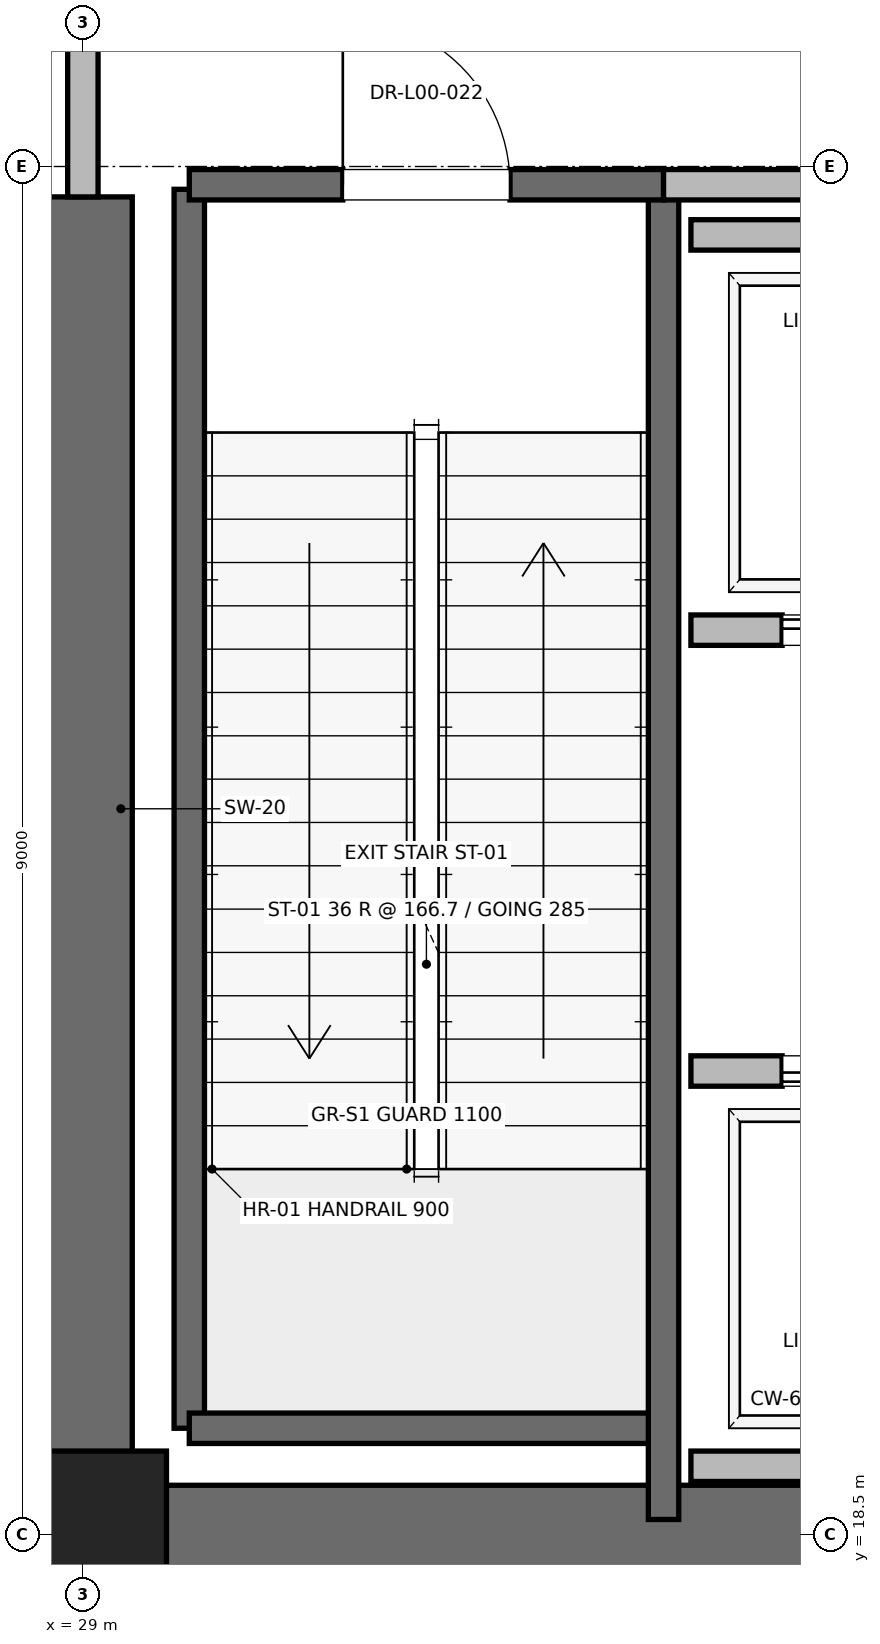
"""IFC4 building model, lengths in metres.
Left out: names, types, materials, properties, quantities, classifications, styles, units other than length and angle.
Written with IfcOpenShell. Run it as: python <this file> out.ifc"""

import sys

from ifc_helpers import new_model, si_unit, direction, frame, frame_2d, origin, origin_2d, place, context, subcontext, project, spatial, rectangle, extrude, element, fill, save


model = new_model("IFC4")
c1 = context("Model", 3, precision=1e-05, world=origin(), true_north=direction((0.0, 1.0)))
c2 = subcontext(c1, "Body", "Model", "MODEL_VIEW")
j1 = project(units=[si_unit("LENGTHUNIT", "METRE"), si_unit("PLANEANGLEUNIT", "RADIAN")], contexts=[c1])
p1 = place(None, origin())
s1 = spatial("IfcSite", under=j1, at=p1, CompositionType="ELEMENT")
p2 = place(p1, origin())
s2 = spatial("IfcBuilding", under=s1, at=p2, CompositionType="ELEMENT")
p3 = place(p2, origin())
s3 = spatial("IfcBuildingStorey", under=s2, at=p3, CompositionType="ELEMENT", Elevation=0.0)
p4 = place(p3, frame((29.0, 18.5, 0.0), z_axis=(0.0, 0.0, 1.0), x_axis=(1.0, 0.0, 0.0)))
e1 = element("IfcColumn", 1, at=p4, inside=s3, PredefinedType="PILASTER", context=c2, shape_type="SweptSolid", body=[
    extrude(rectangle(XDim=1.1, YDim=1.1, at=origin_2d()), origin(), (0.0, 0.0, 1.0), 6.0),
])
p5 = place(p3, frame((29.0, 18.5, 0.0), z_axis=(0.0, 0.0, 1.0), x_axis=(1.0, 0.0, 0.0)))
e2 = element("IfcWall", 2, at=p5, inside=s3, PredefinedType="SHEAR", context=c2, shape_type="SweptSolid", body=[
    extrude(rectangle(XDim=9.2, YDim=0.65, at=frame_2d((4.6, 0.0))), origin(), (0.0, 0.0, 1.0), 5.72),
])
p6 = place(p3, frame((29.0, 18.5, 0.0), z_axis=(0.0, 0.0, 1.0), x_axis=(0.0, 1.0, 0.0)))
e3 = element("IfcWall", 3, at=p6, inside=s3, PredefinedType="SHEAR", context=c2, shape_type="SweptSolid", body=[
    extrude(rectangle(XDim=8.8, YDim=0.65, at=frame_2d((4.4, 0.0))), origin(), (0.0, 0.0, 1.0), 5.72),
])
p7 = place(p3, frame((29.7, 19.2, 0.0), z_axis=(0.0, 0.0, 1.0), x_axis=(0.0, 1.0, 0.0)))
e4 = element("IfcWall", 4, at=p7, inside=s3, PredefinedType="SOLIDWALL", context=c2, shape_type="SweptSolid", body=[
    extrude(rectangle(XDim=8.15, YDim=0.2, at=frame_2d((4.075, 0.0))), origin(), (0.0, 0.0, 1.0), 5.72),
])
p8 = place(p3, frame((29.7, 19.2, 0.0), z_axis=(0.0, 0.0, 1.0), x_axis=(1.0, 0.0, 0.0)))
e5 = element("IfcWall", 5, at=p8, inside=s3, PredefinedType="SOLIDWALL", context=c2, shape_type="SweptSolid", body=[
    extrude(rectangle(XDim=3.12, YDim=0.2, at=frame_2d((1.56, 0.0))), origin(), (0.0, 0.0, 1.0), 5.72),
])
p9 = place(p3, frame((32.82, 18.6, 0.0), z_axis=(0.0, 0.0, 1.0), x_axis=(0.0, 1.0, 0.0)))
e6 = element("IfcWall", 6, at=p9, inside=s3, PredefinedType="SOLIDWALL", context=c2, shape_type="SweptSolid", body=[
    extrude(rectangle(XDim=8.78, YDim=0.2, at=frame_2d((4.39, 0.0))), origin(), (0.0, 0.0, 1.0), 5.72),
])
p10 = place(p3, frame((29.7, 27.38, 0.0), z_axis=(0.0, 0.0, 1.0), x_axis=(1.0, 0.0, 0.0)))
e7 = element("IfcWall", 7, at=p10, inside=s3, PredefinedType="SOLIDWALL", context=c2, shape_type="SweptSolid", body=[
    extrude(rectangle(XDim=3.12, YDim=0.2, at=frame_2d((1.56, 0.0))), origin(), (0.0, 0.0, 1.0), 5.72),
])
p11 = place(p10, frame((1.01, 0.0, 0.0)))
e8 = element("IfcOpeningElement", 8, at=p11, cuts=e7, PredefinedType="OPENING", context=c2, shape_type="SweptSolid", body=[
    extrude(rectangle(XDim=1.1, YDim=2.15, at=frame_2d((0.55, 1.075))), frame((0.0, 0.1, 0.0), z_axis=(0.0, -1.0, 0.0), x_axis=(1.0, 0.0, 0.0)), (0.0, 0.0, 1.0), 0.2),
])
p12 = place(p3, frame((29.0, 30.7, 0.0), z_axis=(0.0, 0.0, 1.0), x_axis=(0.0, -1.0, 0.0)))
e9 = element("IfcWall", 9, at=p12, inside=s3, PredefinedType="PARTITIONING", context=c2, shape_type="SweptSolid", body=[
    extrude(rectangle(XDim=3.4, YDim=0.2, at=frame_2d((1.7, 0.0))), origin(), (0.0, 0.0, 1.0), 4.5),
])
p13 = place(p12, frame((1.125, 0.0, 0.0)))
e10 = element("IfcOpeningElement", 10, at=p13, cuts=e9, PredefinedType="OPENING", context=c2, shape_type="SweptSolid", body=[
    extrude(rectangle(XDim=1.15, YDim=2.2, at=frame_2d((0.575, 1.1))), frame((0.0, 0.1, 0.0), z_axis=(0.0, -1.0, 0.0), x_axis=(1.0, 0.0, 0.0)), (0.0, 0.0, 1.0), 0.2),
])
p14 = place(p3, frame((32.82, 27.38, 0.0), z_axis=(0.0, 0.0, 1.0), x_axis=(1.0, 0.0, 0.0)))
e11 = element("IfcWall", 11, at=p14, inside=s3, PredefinedType="PARTITIONING", context=c2, shape_type="SweptSolid", body=[
    extrude(rectangle(XDim=5.62, YDim=0.2, at=frame_2d((2.81, 0.0))), origin(), (0.0, 0.0, 1.0), 5.72),
])
p15 = place(p3, frame((33.0, 18.95, 0.0), z_axis=(0.0, 0.0, 1.0), x_axis=(1.0, 0.0, 0.0)))
e12 = element("IfcWall", 12, at=p15, inside=s3, PredefinedType="SOLIDWALL", context=c2, shape_type="SweptSolid", body=[
    extrude(rectangle(XDim=2.3, YDim=0.2, at=frame_2d((1.15, 0.0))), origin(), (0.0, 0.0, 1.0), 5.72),
])
p16 = place(p3, frame((35.3, 21.55, 0.0), z_axis=(0.0, 0.0, 1.0), x_axis=(-1.0, 0.0, 0.0)))
e13 = element("IfcWall", 13, at=p16, inside=s3, PredefinedType="SOLIDWALL", context=c2, shape_type="SweptSolid", body=[
    extrude(rectangle(XDim=2.3, YDim=0.2, at=frame_2d((1.15, 0.0))), origin(), (0.0, 0.0, 1.0), 5.72),
])
p17 = place(p16, frame((0.6, 0.0, 0.0)))
e14 = element("IfcOpeningElement", 14, at=p17, cuts=e13, PredefinedType="OPENING", context=c2, shape_type="SweptSolid", body=[
    extrude(rectangle(XDim=1.1, YDim=2.2, at=frame_2d((0.55, 1.1))), frame((0.0, 0.1, 0.0), z_axis=(0.0, -1.0, 0.0), x_axis=(1.0, 0.0, 0.0)), (0.0, 0.0, 1.0), 0.2),
])
p18 = place(p3, frame((33.0, 24.45, 0.0), z_axis=(0.0, 0.0, 1.0), x_axis=(1.0, 0.0, 0.0)))
e15 = element("IfcWall", 15, at=p18, inside=s3, PredefinedType="SOLIDWALL", context=c2, shape_type="SweptSolid", body=[
    extrude(rectangle(XDim=2.3, YDim=0.2, at=frame_2d((1.15, 0.0))), origin(), (0.0, 0.0, 1.0), 5.72),
])
p19 = place(p18, frame((0.6, 0.0, 0.0)))
e16 = element("IfcOpeningElement", 16, at=p19, cuts=e15, PredefinedType="OPENING", context=c2, shape_type="SweptSolid", body=[
    extrude(rectangle(XDim=1.1, YDim=2.2, at=frame_2d((0.55, 1.1))), frame((0.0, 0.1, 0.0), z_axis=(0.0, -1.0, 0.0), x_axis=(1.0, 0.0, 0.0)), (0.0, 0.0, 1.0), 0.2),
])
p20 = place(p3, frame((35.3, 27.05, 0.0), z_axis=(0.0, 0.0, 1.0), x_axis=(-1.0, 0.0, 0.0)))
e17 = element("IfcWall", 17, at=p20, inside=s3, PredefinedType="SOLIDWALL", context=c2, shape_type="SweptSolid", body=[
    extrude(rectangle(XDim=2.3, YDim=0.2, at=frame_2d((1.15, 0.0))), origin(), (0.0, 0.0, 1.0), 5.72),
])
p21 = place(p3, frame((28.85, -1.35, 0.0), z_axis=(0.0, 0.0, 1.0), x_axis=(0.0, 1.0, 0.0)))
e18 = element("IfcWall", 18, at=p21, inside=s3, PredefinedType="PARTITIONING", context=c2, shape_type="SweptSolid", body=[
    extrude(rectangle(XDim=19.75, YDim=0.2, at=frame_2d((9.875, 0.0))), origin(), (0.0, 0.0, 1.0), 2.85),
])
p22 = place(p21, frame((9.3, 0.0, 0.0)))
e19 = element("IfcOpeningElement", 19, at=p22, cuts=e18, PredefinedType="OPENING", context=c2, shape_type="SweptSolid", body=[
    extrude(rectangle(XDim=1.15, YDim=2.2, at=frame_2d((0.575, 1.1))), frame((0.0, 0.1, 0.0), z_axis=(0.0, -1.0, 0.0), x_axis=(1.0, 0.0, 0.0)), (0.0, 0.0, 1.0), 0.2),
])
p23 = place(p11, origin())
e20 = element("IfcDoor", 20, at=p23, inside=s3, OperationType="SINGLE_SWING_LEFT", PredefinedType="DOOR", context=c2, shape_type="SweptSolid", body=[
    extrude(rectangle(XDim=1.1, YDim=2.15, at=frame_2d((0.55, 1.075))), frame((0.0, 0.025, 0.0), z_axis=(0.0, -1.0, 0.0), x_axis=(1.0, 0.0, 0.0)), (0.0, 0.0, 1.0), 0.05),
])
fill(e8, e20)
p24 = place(p17, origin())
e21 = element("IfcDoor", 21, at=p24, inside=s3, OperationType="SLIDING_TO_RIGHT", PredefinedType="DOOR", context=c2, shape_type="SweptSolid", body=[
    extrude(rectangle(XDim=1.1, YDim=2.2, at=frame_2d((0.55, 1.1))), frame((0.0, 0.025, 0.0), z_axis=(0.0, -1.0, 0.0), x_axis=(1.0, 0.0, 0.0)), (0.0, 0.0, 1.0), 0.05),
])
fill(e14, e21)
p25 = place(p19, origin())
e22 = element("IfcDoor", 22, at=p25, inside=s3, OperationType="SLIDING_TO_RIGHT", PredefinedType="DOOR", context=c2, shape_type="SweptSolid", body=[
    extrude(rectangle(XDim=1.1, YDim=2.2, at=frame_2d((0.55, 1.1))), frame((0.0, 0.025, 0.0), z_axis=(0.0, -1.0, 0.0), x_axis=(1.0, 0.0, 0.0)), (0.0, 0.0, 1.0), 0.05),
])
fill(e16, e22)
save(model, sys.argv[1])
